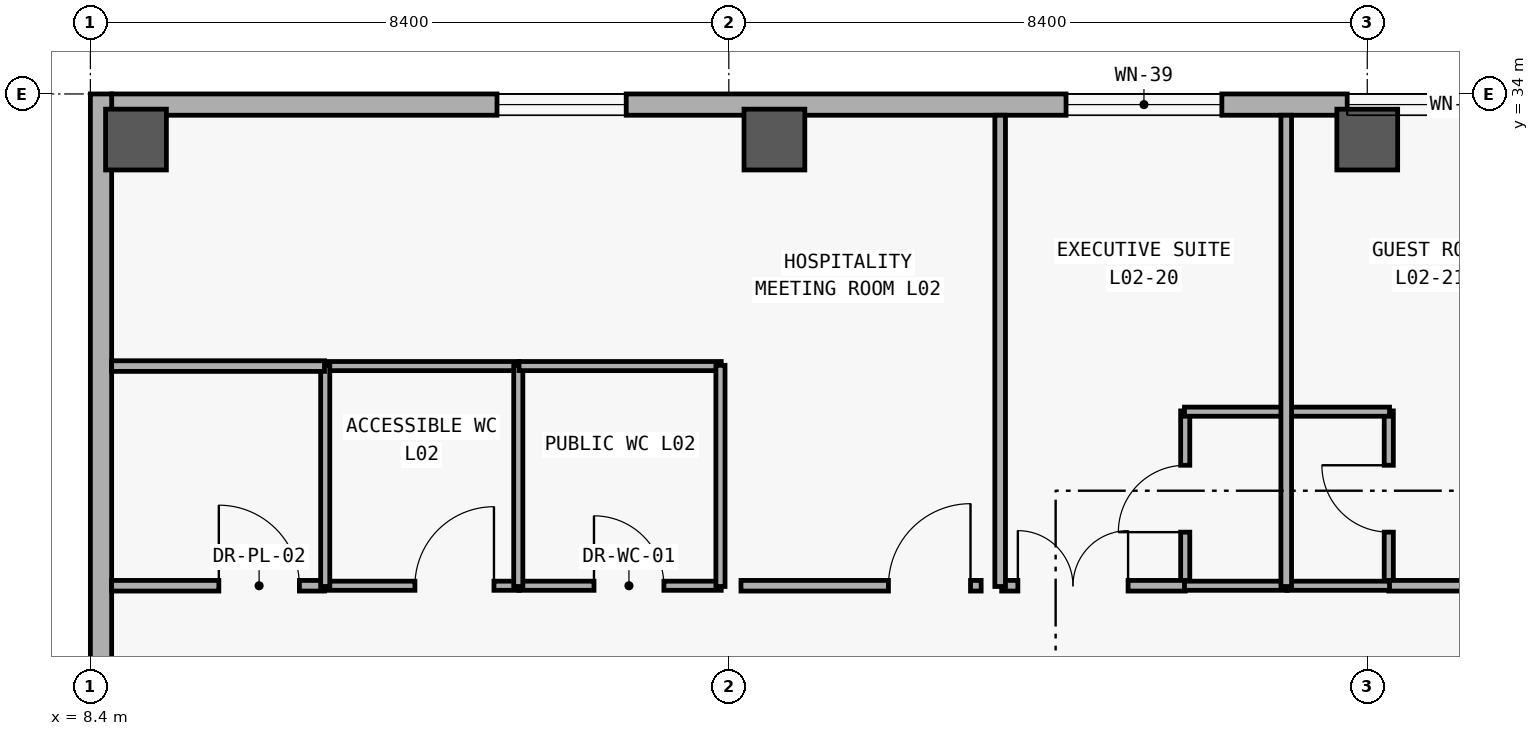
"""IFC4 building model, lengths in metres.
Left out: names, types, materials, properties, quantities, classifications, styles, units other than length and angle.
Written with IfcOpenShell. Run it as: python <this file> out.ifc"""

import sys

from ifc_helpers import new_model, si_unit, direction, frame, frame_2d, origin, origin_2d, place, context, subcontext, project, spatial, rectangle, extrude, element, fill, save


model = new_model("IFC4")
c1 = context("Model", 3, precision=1e-05, world=origin(), true_north=direction((0.0, 1.0)))
c2 = subcontext(c1, "Body", "Model", "MODEL_VIEW")
j1 = project(units=[si_unit("LENGTHUNIT", "METRE"), si_unit("PLANEANGLEUNIT", "RADIAN")], contexts=[c1])
p1 = place(None, origin())
s1 = spatial("IfcSite", under=j1, at=p1, CompositionType="ELEMENT")
p2 = place(p1, origin())
s2 = spatial("IfcBuilding", under=s1, at=p2, CompositionType="ELEMENT")
p3 = place(p2, frame((0.0, 0.0, 10.8)))
s3 = spatial("IfcBuildingStorey", under=s2, at=p3, CompositionType="ELEMENT", Elevation=10.8)
for number, where, z_axis, x_axis in (
    (1, (9.0, 33.4, 0.0), (0.0, 0.0, 1.0), (1.0, 0.0, 0.0)),
    (2, (17.4, 33.4, 0.0), (0.0, 0.0, 1.0), (1.0, 0.0, 0.0)),
    (3, (25.2, 33.4, 0.0), (0.0, 0.0, 1.0), (1.0, 0.0, 0.0)),
):
    element("IfcColumn", number, at=place(p3, frame(where, z_axis=z_axis, x_axis=x_axis)), inside=s3, PredefinedType="COLUMN", context=c2, shape_type="SweptSolid", body=[
        extrude(rectangle(XDim=0.8, YDim=0.8, at=origin_2d()), origin(), (0.0, 0.0, 1.0), 4.2),
    ])
p4 = place(p3, frame((8.68, 33.86, 0.0), z_axis=(0.0, 0.0, 1.0), x_axis=(1.0, 0.0, 0.0)))
e4 = element("IfcWall", 4, at=p4, inside=s3, PredefinedType="SOLIDWALL", context=c2, shape_type="SweptSolid", body=[
    extrude(rectangle(XDim=83.44, YDim=0.28, at=frame_2d((41.72, 0.0))), origin(), (0.0, 0.0, 1.0), 3.92),
])
p5 = place(p4, frame((5.07, 0.0, 0.85)))
e5 = element("IfcOpeningElement", 5, at=p5, cuts=e4, PredefinedType="OPENING", context=c2, shape_type="SweptSolid", body=[
    extrude(rectangle(XDim=1.7, YDim=2.0, at=frame_2d((0.85, 1.0))), frame((0.0, 0.15, 0.0), z_axis=(0.0, -1.0, 0.0), x_axis=(1.0, 0.0, 0.0)), (0.0, 0.0, 1.0), 0.3),
])
p6 = place(p4, frame((12.557, 0.0, 0.85)))
e6 = element("IfcOpeningElement", 6, at=p6, cuts=e4, PredefinedType="OPENING", context=c2, shape_type="SweptSolid", body=[
    extrude(rectangle(XDim=2.05, YDim=1.95, at=frame_2d((1.025, 0.975))), frame((0.0, 0.15, 0.0), z_axis=(0.0, -1.0, 0.0), x_axis=(1.0, 0.0, 0.0)), (0.0, 0.0, 1.0), 0.3),
])
p7 = place(p4, frame((16.256, 0.0, 0.85)))
e7 = element("IfcOpeningElement", 7, at=p7, cuts=e4, PredefinedType="OPENING", context=c2, shape_type="SweptSolid", body=[
    extrude(rectangle(XDim=2.18, YDim=1.95, at=frame_2d((1.09, 0.975))), frame((0.0, 0.15, 0.0), z_axis=(0.0, -1.0, 0.0), x_axis=(1.0, 0.0, 0.0)), (0.0, 0.0, 1.0), 0.3),
])
p8 = place(p4, frame((19.921, 0.0, 0.85)))
e8 = element("IfcOpeningElement", 8, at=p8, cuts=e4, PredefinedType="OPENING", context=c2, shape_type="SweptSolid", body=[
    extrude(rectangle(XDim=2.38, YDim=1.95, at=frame_2d((1.19, 0.975))), frame((0.0, 0.15, 0.0), z_axis=(0.0, -1.0, 0.0), x_axis=(1.0, 0.0, 0.0)), (0.0, 0.0, 1.0), 0.3),
])
p9 = place(p4, frame((23.635, 0.0, 0.85)))
e9 = element("IfcOpeningElement", 9, at=p9, cuts=e4, PredefinedType="OPENING", context=c2, shape_type="SweptSolid", body=[
    extrude(rectangle(XDim=2.48, YDim=2.0, at=frame_2d((1.24, 1.0))), frame((0.0, 0.15, 0.0), z_axis=(0.0, -1.0, 0.0), x_axis=(1.0, 0.0, 0.0)), (0.0, 0.0, 1.0), 0.3),
])
p10 = place(p4, frame((27.314, 0.0, 0.85)))
e10 = element("IfcOpeningElement", 10, at=p10, cuts=e4, PredefinedType="OPENING", context=c2, shape_type="SweptSolid", body=[
    extrude(rectangle(XDim=2.65, YDim=2.0, at=frame_2d((1.325, 1.0))), frame((0.0, 0.15, 0.0), z_axis=(0.0, -1.0, 0.0), x_axis=(1.0, 0.0, 0.0)), (0.0, 0.0, 1.0), 0.3),
])
p11 = place(p4, frame((31.503, 0.0, 0.85)))
e11 = element("IfcOpeningElement", 11, at=p11, cuts=e4, PredefinedType="OPENING", context=c2, shape_type="SweptSolid", body=[
    extrude(rectangle(XDim=1.8, YDim=1.8, at=frame_2d((0.9, 0.9))), frame((0.0, 0.15, 0.0), z_axis=(0.0, -1.0, 0.0), x_axis=(1.0, 0.0, 0.0)), (0.0, 0.0, 1.0), 0.3),
])
p12 = place(p4, frame((35.117, 0.0, 0.85)))
e12 = element("IfcOpeningElement", 12, at=p12, cuts=e4, PredefinedType="OPENING", context=c2, shape_type="SweptSolid", body=[
    extrude(rectangle(XDim=2.1, YDim=1.8, at=frame_2d((1.05, 0.9))), frame((0.0, 0.15, 0.0), z_axis=(0.0, -1.0, 0.0), x_axis=(1.0, 0.0, 0.0)), (0.0, 0.0, 1.0), 0.3),
])
p13 = place(p4, frame((38.731, 0.0, 0.85)))
e13 = element("IfcOpeningElement", 13, at=p13, cuts=e4, PredefinedType="OPENING", context=c2, shape_type="SweptSolid", body=[
    extrude(rectangle(XDim=2.4, YDim=1.8, at=frame_2d((1.2, 0.9))), frame((0.0, 0.15, 0.0), z_axis=(0.0, -1.0, 0.0), x_axis=(1.0, 0.0, 0.0)), (0.0, 0.0, 1.0), 0.3),
])
p14 = place(p4, frame((42.346, 0.0, 0.85)))
e14 = element("IfcOpeningElement", 14, at=p14, cuts=e4, PredefinedType="OPENING", context=c2, shape_type="SweptSolid", body=[
    extrude(rectangle(XDim=2.7, YDim=1.85, at=frame_2d((1.35, 0.925))), frame((0.0, 0.15, 0.0), z_axis=(0.0, -1.0, 0.0), x_axis=(1.0, 0.0, 0.0)), (0.0, 0.0, 1.0), 0.3),
])
p15 = place(p4, frame((46.71, 0.0, 0.85)))
e15 = element("IfcOpeningElement", 15, at=p15, cuts=e4, PredefinedType="OPENING", context=c2, shape_type="SweptSolid", body=[
    extrude(rectangle(XDim=1.5, YDim=1.75, at=frame_2d((0.75, 0.875))), frame((0.0, 0.15, 0.0), z_axis=(0.0, -1.0, 0.0), x_axis=(1.0, 0.0, 0.0)), (0.0, 0.0, 1.0), 0.3),
])
p16 = place(p4, frame((50.399, 0.0, 0.85)))
e16 = element("IfcOpeningElement", 16, at=p16, cuts=e4, PredefinedType="OPENING", context=c2, shape_type="SweptSolid", body=[
    extrude(rectangle(XDim=1.65, YDim=1.75, at=frame_2d((0.825, 0.875))), frame((0.0, 0.15, 0.0), z_axis=(0.0, -1.0, 0.0), x_axis=(1.0, 0.0, 0.0)), (0.0, 0.0, 1.0), 0.3),
])
p17 = place(p4, frame((54.014, 0.0, 0.85)))
e17 = element("IfcOpeningElement", 17, at=p17, cuts=e4, PredefinedType="OPENING", context=c2, shape_type="SweptSolid", body=[
    extrude(rectangle(XDim=1.95, YDim=1.75, at=frame_2d((0.975, 0.875))), frame((0.0, 0.15, 0.0), z_axis=(0.0, -1.0, 0.0), x_axis=(1.0, 0.0, 0.0)), (0.0, 0.0, 1.0), 0.3),
])
p18 = place(p4, frame((57.628, 0.0, 0.85)))
e18 = element("IfcOpeningElement", 18, at=p18, cuts=e4, PredefinedType="OPENING", context=c2, shape_type="SweptSolid", body=[
    extrude(rectangle(XDim=2.25, YDim=1.75, at=frame_2d((1.125, 0.875))), frame((0.0, 0.15, 0.0), z_axis=(0.0, -1.0, 0.0), x_axis=(1.0, 0.0, 0.0)), (0.0, 0.0, 1.0), 0.3),
])
p19 = place(p4, frame((61.242, 0.0, 0.85)))
e19 = element("IfcOpeningElement", 19, at=p19, cuts=e4, PredefinedType="OPENING", context=c2, shape_type="SweptSolid", body=[
    extrude(rectangle(XDim=2.55, YDim=1.8, at=frame_2d((1.275, 0.9))), frame((0.0, 0.15, 0.0), z_axis=(0.0, -1.0, 0.0), x_axis=(1.0, 0.0, 0.0)), (0.0, 0.0, 1.0), 0.3),
])
p20 = place(p4, frame((64.856, 0.0, 0.85)))
e20 = element("IfcOpeningElement", 20, at=p20, cuts=e4, PredefinedType="OPENING", context=c2, shape_type="SweptSolid", body=[
    extrude(rectangle(XDim=2.85, YDim=1.85, at=frame_2d((1.425, 0.925))), frame((0.0, 0.15, 0.0), z_axis=(0.0, -1.0, 0.0), x_axis=(1.0, 0.0, 0.0)), (0.0, 0.0, 1.0), 0.3),
])
p21 = place(p4, frame((69.345, 0.0, 0.85)))
e21 = element("IfcOpeningElement", 21, at=p21, cuts=e4, PredefinedType="OPENING", context=c2, shape_type="SweptSolid", body=[
    extrude(rectangle(XDim=1.4, YDim=1.6, at=frame_2d((0.7, 0.8))), frame((0.0, 0.15, 0.0), z_axis=(0.0, -1.0, 0.0), x_axis=(1.0, 0.0, 0.0)), (0.0, 0.0, 1.0), 0.3),
])
p22 = place(p4, frame((73.009, 0.0, 0.85)))
e22 = element("IfcOpeningElement", 22, at=p22, cuts=e4, PredefinedType="OPENING", context=c2, shape_type="SweptSolid", body=[
    extrude(rectangle(XDim=1.6, YDim=1.6, at=frame_2d((0.8, 0.8))), frame((0.0, 0.15, 0.0), z_axis=(0.0, -1.0, 0.0), x_axis=(1.0, 0.0, 0.0)), (0.0, 0.0, 1.0), 0.3),
])
p23 = place(p4, frame((76.674, 0.0, 0.85)))
e23 = element("IfcOpeningElement", 23, at=p23, cuts=e4, PredefinedType="OPENING", context=c2, shape_type="SweptSolid", body=[
    extrude(rectangle(XDim=1.8, YDim=1.6, at=frame_2d((0.9, 0.8))), frame((0.0, 0.15, 0.0), z_axis=(0.0, -1.0, 0.0), x_axis=(1.0, 0.0, 0.0)), (0.0, 0.0, 1.0), 0.3),
])
p24 = place(p4, frame((80.338, 0.0, 0.85)))
e24 = element("IfcOpeningElement", 24, at=p24, cuts=e4, PredefinedType="OPENING", context=c2, shape_type="SweptSolid", body=[
    extrude(rectangle(XDim=2.0, YDim=1.65, at=frame_2d((1.0, 0.825))), frame((0.0, 0.15, 0.0), z_axis=(0.0, -1.0, 0.0), x_axis=(1.0, 0.0, 0.0)), (0.0, 0.0, 1.0), 0.3),
])
p25 = place(p3, frame((8.54, 6.0, 0.0), z_axis=(0.0, 0.0, 1.0), x_axis=(0.0, 1.0, 0.0)))
e25 = element("IfcWall", 25, at=p25, inside=s3, PredefinedType="SOLIDWALL", context=c2, shape_type="SweptSolid", body=[
    extrude(rectangle(XDim=28.0, YDim=0.28, at=frame_2d((14.0, 0.0))), origin(), (0.0, 0.0, 1.0), 3.92),
])
p26 = place(p25, frame((4.5, 0.0, 0.95)))
e26 = element("IfcOpeningElement", 26, at=p26, cuts=e25, PredefinedType="OPENING", context=c2, shape_type="SweptSolid", body=[
    extrude(rectangle(XDim=1.6, YDim=1.6, at=frame_2d((0.8, 0.8))), frame((0.0, 0.15, 0.0), z_axis=(0.0, -1.0, 0.0), x_axis=(1.0, 0.0, 0.0)), (0.0, 0.0, 1.0), 0.3),
])
p27 = place(p3, frame((22.805, 27.52, 0.0), z_axis=(0.0, 0.0, 1.0), x_axis=(0.0, 1.0, 0.0)))
e27 = element("IfcWall", 27, at=p27, inside=s3, PredefinedType="PARTITIONING", context=c2, shape_type="SweptSolid", body=[
    extrude(rectangle(XDim=2.31, YDim=0.12, at=frame_2d((1.155, 0.0))), origin(), (0.0, 0.0, 1.0), 3.02),
])
p28 = place(p27, frame((0.715, 0.0, 0.0)))
e28 = element("IfcOpeningElement", 28, at=p28, cuts=e27, PredefinedType="OPENING", context=c2, shape_type="SweptSolid", body=[
    extrude(rectangle(XDim=0.88, YDim=2.15, at=frame_2d((0.44, 1.075))), frame((0.0, 0.07, 0.0), z_axis=(0.0, -1.0, 0.0), x_axis=(1.0, 0.0, 0.0)), (0.0, 0.0, 1.0), 0.14),
])
p29 = place(p3, frame((25.483, 27.52, 0.0), z_axis=(0.0, 0.0, 1.0), x_axis=(0.0, 1.0, 0.0)))
e29 = element("IfcWall", 29, at=p29, inside=s3, PredefinedType="PARTITIONING", context=c2, shape_type="SweptSolid", body=[
    extrude(rectangle(XDim=2.31, YDim=0.12, at=frame_2d((1.155, 0.0))), origin(), (0.0, 0.0, 1.0), 3.02),
])
p30 = place(p29, frame((0.715, 0.0, 0.0)))
e30 = element("IfcOpeningElement", 30, at=p30, cuts=e29, PredefinedType="OPENING", context=c2, shape_type="SweptSolid", body=[
    extrude(rectangle(XDim=0.88, YDim=2.15, at=frame_2d((0.44, 1.075))), frame((0.0, 0.07, 0.0), z_axis=(0.0, -1.0, 0.0), x_axis=(1.0, 0.0, 0.0)), (0.0, 0.0, 1.0), 0.14),
])
p31 = place(p3, frame((11.48, 27.53, 0.0), z_axis=(0.0, 0.0, 1.0), x_axis=(1.0, 0.0, 0.0)))
e31 = element("IfcWall", 31, at=p31, inside=s3, PredefinedType="PARTITIONING", context=c2, shape_type="SweptSolid", body=[
    extrude(rectangle(XDim=2.56, YDim=0.12, at=frame_2d((1.28, 0.0))), origin(), (0.0, 0.0, 1.0), 3.02),
])
p32 = place(p31, frame((1.19, 0.0, 0.0)))
e32 = element("IfcOpeningElement", 32, at=p32, cuts=e31, PredefinedType="OPENING", context=c2, shape_type="SweptSolid", body=[
    extrude(rectangle(XDim=1.04, YDim=2.15, at=frame_2d((0.52, 1.075))), frame((0.0, 0.07, 0.0), z_axis=(0.0, -1.0, 0.0), x_axis=(1.0, 0.0, 0.0)), (0.0, 0.0, 1.0), 0.14),
])
p33 = place(p3, frame((14.04, 27.53, 0.0), z_axis=(0.0, 0.0, 1.0), x_axis=(1.0, 0.0, 0.0)))
e33 = element("IfcWall", 33, at=p33, inside=s3, PredefinedType="PARTITIONING", context=c2, shape_type="SweptSolid", body=[
    extrude(rectangle(XDim=2.66, YDim=0.12, at=frame_2d((1.33, 0.0))), origin(), (0.0, 0.0, 1.0), 3.02),
])
p34 = place(p33, frame((0.986, 0.0, 0.0)))
e34 = element("IfcOpeningElement", 34, at=p34, cuts=e33, PredefinedType="OPENING", context=c2, shape_type="SweptSolid", body=[
    extrude(rectangle(XDim=0.92, YDim=2.15, at=frame_2d((0.46, 1.075))), frame((0.0, 0.07, 0.0), z_axis=(0.0, -1.0, 0.0), x_axis=(1.0, 0.0, 0.0)), (0.0, 0.0, 1.0), 0.14),
])
p35 = place(p3, frame((8.68, 27.53, 0.0), z_axis=(0.0, 0.0, 1.0), x_axis=(1.0, 0.0, 0.0)))
e35 = element("IfcWall", 35, at=p35, inside=s3, PredefinedType="PARTITIONING", context=c2, shape_type="SweptSolid", body=[
    extrude(rectangle(XDim=2.8, YDim=0.14, at=frame_2d((1.4, 0.0))), origin(), (0.0, 0.0, 1.0), 3.02),
])
p36 = place(p35, frame((1.41, 0.0, 0.0)))
e36 = element("IfcOpeningElement", 36, at=p36, cuts=e35, PredefinedType="OPENING", context=c2, shape_type="SweptSolid", body=[
    extrude(rectangle(XDim=1.06, YDim=2.2, at=frame_2d((0.53, 1.1))), frame((0.0, 0.08, 0.0), z_axis=(0.0, -1.0, 0.0), x_axis=(1.0, 0.0, 0.0)), (0.0, 0.0, 1.0), 0.16),
])
p37 = place(p3, frame((16.96, 27.53, 0.0), z_axis=(0.0, 0.0, 1.0), x_axis=(1.0, 0.0, 0.0)))
e37 = element("IfcWall", 37, at=p37, inside=s3, PredefinedType="PARTITIONING", context=c2, shape_type="SweptSolid", body=[
    extrude(rectangle(XDim=3.16, YDim=0.14, at=frame_2d((1.58, 0.0))), origin(), (0.0, 0.0, 1.0), 3.02),
])
p38 = place(p37, frame((1.94, 0.0, 0.0)))
e38 = element("IfcOpeningElement", 38, at=p38, cuts=e37, PredefinedType="OPENING", context=c2, shape_type="SweptSolid", body=[
    extrude(rectangle(XDim=1.08, YDim=2.25, at=frame_2d((0.54, 1.125))), frame((0.0, 0.08, 0.0), z_axis=(0.0, -1.0, 0.0), x_axis=(1.0, 0.0, 0.0)), (0.0, 0.0, 1.0), 0.16),
])
p39 = place(p3, frame((20.39, 27.53, 0.0), z_axis=(0.0, 0.0, 1.0), x_axis=(1.0, 0.0, 0.0)))
e39 = element("IfcWall", 39, at=p39, inside=s3, PredefinedType="PARTITIONING", context=c2, shape_type="SweptSolid", body=[
    extrude(rectangle(XDim=2.415, YDim=0.14, at=frame_2d((1.208, 0.0))), origin(), (0.0, 0.0, 1.0), 3.02),
])
p40 = place(p39, frame((0.213, 0.0, 0.0)))
e40 = element("IfcOpeningElement", 40, at=p40, cuts=e39, PredefinedType="OPENING", context=c2, shape_type="SweptSolid", body=[
    extrude(rectangle(XDim=1.45, YDim=2.3, at=frame_2d((0.725, 1.15))), frame((0.0, 0.08, 0.0), z_axis=(0.0, -1.0, 0.0), x_axis=(1.0, 0.0, 0.0)), (0.0, 0.0, 1.0), 0.16),
])
p41 = place(p3, frame((25.483, 27.53, 0.0), z_axis=(0.0, 0.0, 1.0), x_axis=(1.0, 0.0, 0.0)))
e41 = element("IfcWall", 41, at=p41, inside=s3, PredefinedType="PARTITIONING", context=c2, shape_type="SweptSolid", body=[
    extrude(rectangle(XDim=2.415, YDim=0.14, at=frame_2d((1.208, 0.0))), origin(), (0.0, 0.0, 1.0), 3.02),
])
p42 = place(p41, frame((1.335, 0.0, 0.0)))
e42 = element("IfcOpeningElement", 42, at=p42, cuts=e41, PredefinedType="OPENING", context=c2, shape_type="SweptSolid", body=[
    extrude(rectangle(XDim=0.94, YDim=2.2, at=frame_2d((0.47, 1.1))), frame((0.0, 0.08, 0.0), z_axis=(0.0, -1.0, 0.0), x_axis=(1.0, 0.0, 0.0)), (0.0, 0.0, 1.0), 0.16),
])
for number, where, z_axis, x_axis in (
    (43, (22.795, 27.53, 0.0), (0.0, 0.0, 1.0), (1.0, 0.0, 0.0)),
    (44, (22.795, 29.82, 0.0), (0.0, 0.0, 1.0), (1.0, 0.0, 0.0)),
):
    element("IfcWall", number, at=place(p3, frame(where, z_axis=z_axis, x_axis=x_axis)), inside=s3, PredefinedType="PARTITIONING", context=c2, shape_type="SweptSolid", body=[
        extrude(rectangle(XDim=1.349, YDim=0.12, at=frame_2d((0.675, 0.0))), origin(), (0.0, 0.0, 1.0), 3.02),
    ])
for number, where, z_axis, x_axis in (
    (45, (24.144, 27.53, 0.0), (0.0, 0.0, 1.0), (1.0, 0.0, 0.0)),
    (46, (24.144, 29.82, 0.0), (0.0, 0.0, 1.0), (1.0, 0.0, 0.0)),
):
    element("IfcWall", number, at=place(p3, frame(where, z_axis=z_axis, x_axis=x_axis)), inside=s3, PredefinedType="PARTITIONING", context=c2, shape_type="SweptSolid", body=[
        extrude(rectangle(XDim=1.349, YDim=0.12, at=frame_2d((0.674, 0.0))), origin(), (0.0, 0.0, 1.0), 3.02),
    ])
p43 = place(p3, frame((11.48, 30.42, 0.0), z_axis=(0.0, 0.0, 1.0), x_axis=(1.0, 0.0, 0.0)))
e47 = element("IfcWall", 47, at=p43, inside=s3, PredefinedType="PARTITIONING", context=c2, shape_type="SweptSolid", body=[
    extrude(rectangle(XDim=2.56, YDim=0.12, at=frame_2d((1.28, 0.0))), origin(), (0.0, 0.0, 1.0), 3.02),
])
for number, where, z_axis, x_axis in (
    (48, (11.49, 27.52, 0.0), (0.0, 0.0, 1.0), (0.0, 1.0, 0.0)),
    (49, (14.03, 27.52, 0.0), (0.0, 0.0, 1.0), (0.0, 1.0, 0.0)),
):
    element("IfcWall", number, at=place(p3, frame(where, z_axis=z_axis, x_axis=x_axis)), inside=s3, PredefinedType="PARTITIONING", context=c2, shape_type="SweptSolid", body=[
        extrude(rectangle(XDim=2.91, YDim=0.12, at=frame_2d((1.455, 0.0))), origin(), (0.0, 0.0, 1.0), 3.02),
    ])
p44 = place(p3, frame((14.04, 30.42, 0.0), z_axis=(0.0, 0.0, 1.0), x_axis=(1.0, 0.0, 0.0)))
e50 = element("IfcWall", 50, at=p44, inside=s3, PredefinedType="PARTITIONING", context=c2, shape_type="SweptSolid", body=[
    extrude(rectangle(XDim=2.66, YDim=0.12, at=frame_2d((1.33, 0.0))), origin(), (0.0, 0.0, 1.0), 3.02),
])
p45 = place(p3, frame((16.69, 27.52, 0.0), z_axis=(0.0, 0.0, 1.0), x_axis=(0.0, 1.0, 0.0)))
e51 = element("IfcWall", 51, at=p45, inside=s3, PredefinedType="PARTITIONING", context=c2, shape_type="SweptSolid", body=[
    extrude(rectangle(XDim=2.91, YDim=0.12, at=frame_2d((1.455, 0.0))), origin(), (0.0, 0.0, 1.0), 3.02),
])
p46 = place(p3, frame((8.68, 30.42, 0.0), z_axis=(0.0, 0.0, 1.0), x_axis=(1.0, 0.0, 0.0)))
e52 = element("IfcWall", 52, at=p46, inside=s3, PredefinedType="PARTITIONING", context=c2, shape_type="SweptSolid", body=[
    extrude(rectangle(XDim=2.8, YDim=0.14, at=frame_2d((1.4, 0.0))), origin(), (0.0, 0.0, 1.0), 3.02),
])
for number, where, z_axis, x_axis in (
    (53, (20.37, 27.52, 0.0), (0.0, 0.0, 1.0), (0.0, 1.0, 0.0)),
    (54, (24.134, 27.52, 0.0), (0.0, 0.0, 1.0), (0.0, 1.0, 0.0)),
):
    element("IfcWall", number, at=place(p3, frame(where, z_axis=z_axis, x_axis=x_axis)), inside=s3, PredefinedType="PARTITIONING", context=c2, shape_type="SweptSolid", body=[
        extrude(rectangle(XDim=6.2, YDim=0.14, at=frame_2d((3.1, 0.0))), origin(), (0.0, 0.0, 1.0), 3.02),
    ])
p47 = place(p5, origin())
e55 = element("IfcWindow", 55, at=p47, inside=s3, PartitioningType="SINGLE_PANEL", PredefinedType="WINDOW", context=c2, shape_type="SweptSolid", body=[
    extrude(rectangle(XDim=1.7, YDim=2.0, at=frame_2d((0.85, 1.0))), frame((0.0, 0.03, 0.0), z_axis=(0.0, -1.0, 0.0), x_axis=(1.0, 0.0, 0.0)), (0.0, 0.0, 1.0), 0.06),
])
fill(e5, e55)
p48 = place(p6, origin())
e56 = element("IfcWindow", 56, at=p48, inside=s3, PartitioningType="SINGLE_PANEL", PredefinedType="WINDOW", context=c2, shape_type="SweptSolid", body=[
    extrude(rectangle(XDim=2.05, YDim=1.95, at=frame_2d((1.025, 0.975))), frame((0.0, 0.03, 0.0), z_axis=(0.0, -1.0, 0.0), x_axis=(1.0, 0.0, 0.0)), (0.0, 0.0, 1.0), 0.06),
])
fill(e6, e56)
p49 = place(p7, origin())
e57 = element("IfcWindow", 57, at=p49, inside=s3, PartitioningType="SINGLE_PANEL", PredefinedType="WINDOW", context=c2, shape_type="SweptSolid", body=[
    extrude(rectangle(XDim=2.18, YDim=1.95, at=frame_2d((1.09, 0.975))), frame((0.0, 0.03, 0.0), z_axis=(0.0, -1.0, 0.0), x_axis=(1.0, 0.0, 0.0)), (0.0, 0.0, 1.0), 0.06),
])
fill(e7, e57)
p50 = place(p28, origin())
e58 = element("IfcDoor", 58, at=p50, inside=s3, OperationType="SINGLE_SWING_LEFT", PredefinedType="DOOR", context=c2, shape_type="SweptSolid", body=[
    extrude(rectangle(XDim=0.88, YDim=2.15, at=frame_2d((0.44, 1.075))), frame((0.0, 0.025, 0.0), z_axis=(0.0, -1.0, 0.0), x_axis=(1.0, 0.0, 0.0)), (0.0, 0.0, 1.0), 0.05),
])
fill(e28, e58)
p51 = place(p30, origin())
e59 = element("IfcDoor", 59, at=p51, inside=s3, OperationType="SINGLE_SWING_RIGHT", PredefinedType="DOOR", context=c2, shape_type="SweptSolid", body=[
    extrude(rectangle(XDim=0.88, YDim=2.15, at=frame_2d((0.44, 1.075))), frame((0.0, 0.025, 0.0), z_axis=(0.0, -1.0, 0.0), x_axis=(1.0, 0.0, 0.0)), (0.0, 0.0, 1.0), 0.05),
])
fill(e30, e59)
p52 = place(p32, origin())
e60 = element("IfcDoor", 60, at=p52, inside=s3, OperationType="SINGLE_SWING_RIGHT", PredefinedType="DOOR", context=c2, shape_type="SweptSolid", body=[
    extrude(rectangle(XDim=1.04, YDim=2.15, at=frame_2d((0.52, 1.075))), frame((0.0, 0.025, 0.0), z_axis=(0.0, -1.0, 0.0), x_axis=(1.0, 0.0, 0.0)), (0.0, 0.0, 1.0), 0.05),
])
fill(e32, e60)
p53 = place(p34, origin())
e61 = element("IfcDoor", 61, at=p53, inside=s3, OperationType="SINGLE_SWING_LEFT", PredefinedType="DOOR", context=c2, shape_type="SweptSolid", body=[
    extrude(rectangle(XDim=0.92, YDim=2.15, at=frame_2d((0.46, 1.075))), frame((0.0, 0.025, 0.0), z_axis=(0.0, -1.0, 0.0), x_axis=(1.0, 0.0, 0.0)), (0.0, 0.0, 1.0), 0.05),
])
fill(e34, e61)
p54 = place(p36, origin())
e62 = element("IfcDoor", 62, at=p54, inside=s3, OperationType="SINGLE_SWING_LEFT", PredefinedType="DOOR", context=c2, shape_type="SweptSolid", body=[
    extrude(rectangle(XDim=1.06, YDim=2.2, at=frame_2d((0.53, 1.1))), frame((0.0, 0.025, 0.0), z_axis=(0.0, -1.0, 0.0), x_axis=(1.0, 0.0, 0.0)), (0.0, 0.0, 1.0), 0.05),
])
fill(e36, e62)
p55 = place(p38, origin())
e63 = element("IfcDoor", 63, at=p55, inside=s3, OperationType="SINGLE_SWING_RIGHT", PredefinedType="DOOR", context=c2, shape_type="SweptSolid", body=[
    extrude(rectangle(XDim=1.08, YDim=2.25, at=frame_2d((0.54, 1.125))), frame((0.0, 0.025, 0.0), z_axis=(0.0, -1.0, 0.0), x_axis=(1.0, 0.0, 0.0)), (0.0, 0.0, 1.0), 0.05),
])
fill(e38, e63)
p56 = place(p40, origin())
e64 = element("IfcDoor", 64, at=p56, inside=s3, OperationType="DOUBLE_DOOR_SINGLE_SWING", PredefinedType="DOOR", context=c2, shape_type="SweptSolid", body=[
    extrude(rectangle(XDim=1.45, YDim=2.3, at=frame_2d((0.725, 1.15))), frame((0.0, 0.025, 0.0), z_axis=(0.0, -1.0, 0.0), x_axis=(1.0, 0.0, 0.0)), (0.0, 0.0, 1.0), 0.05),
])
fill(e40, e64)
save(model, sys.argv[1])
